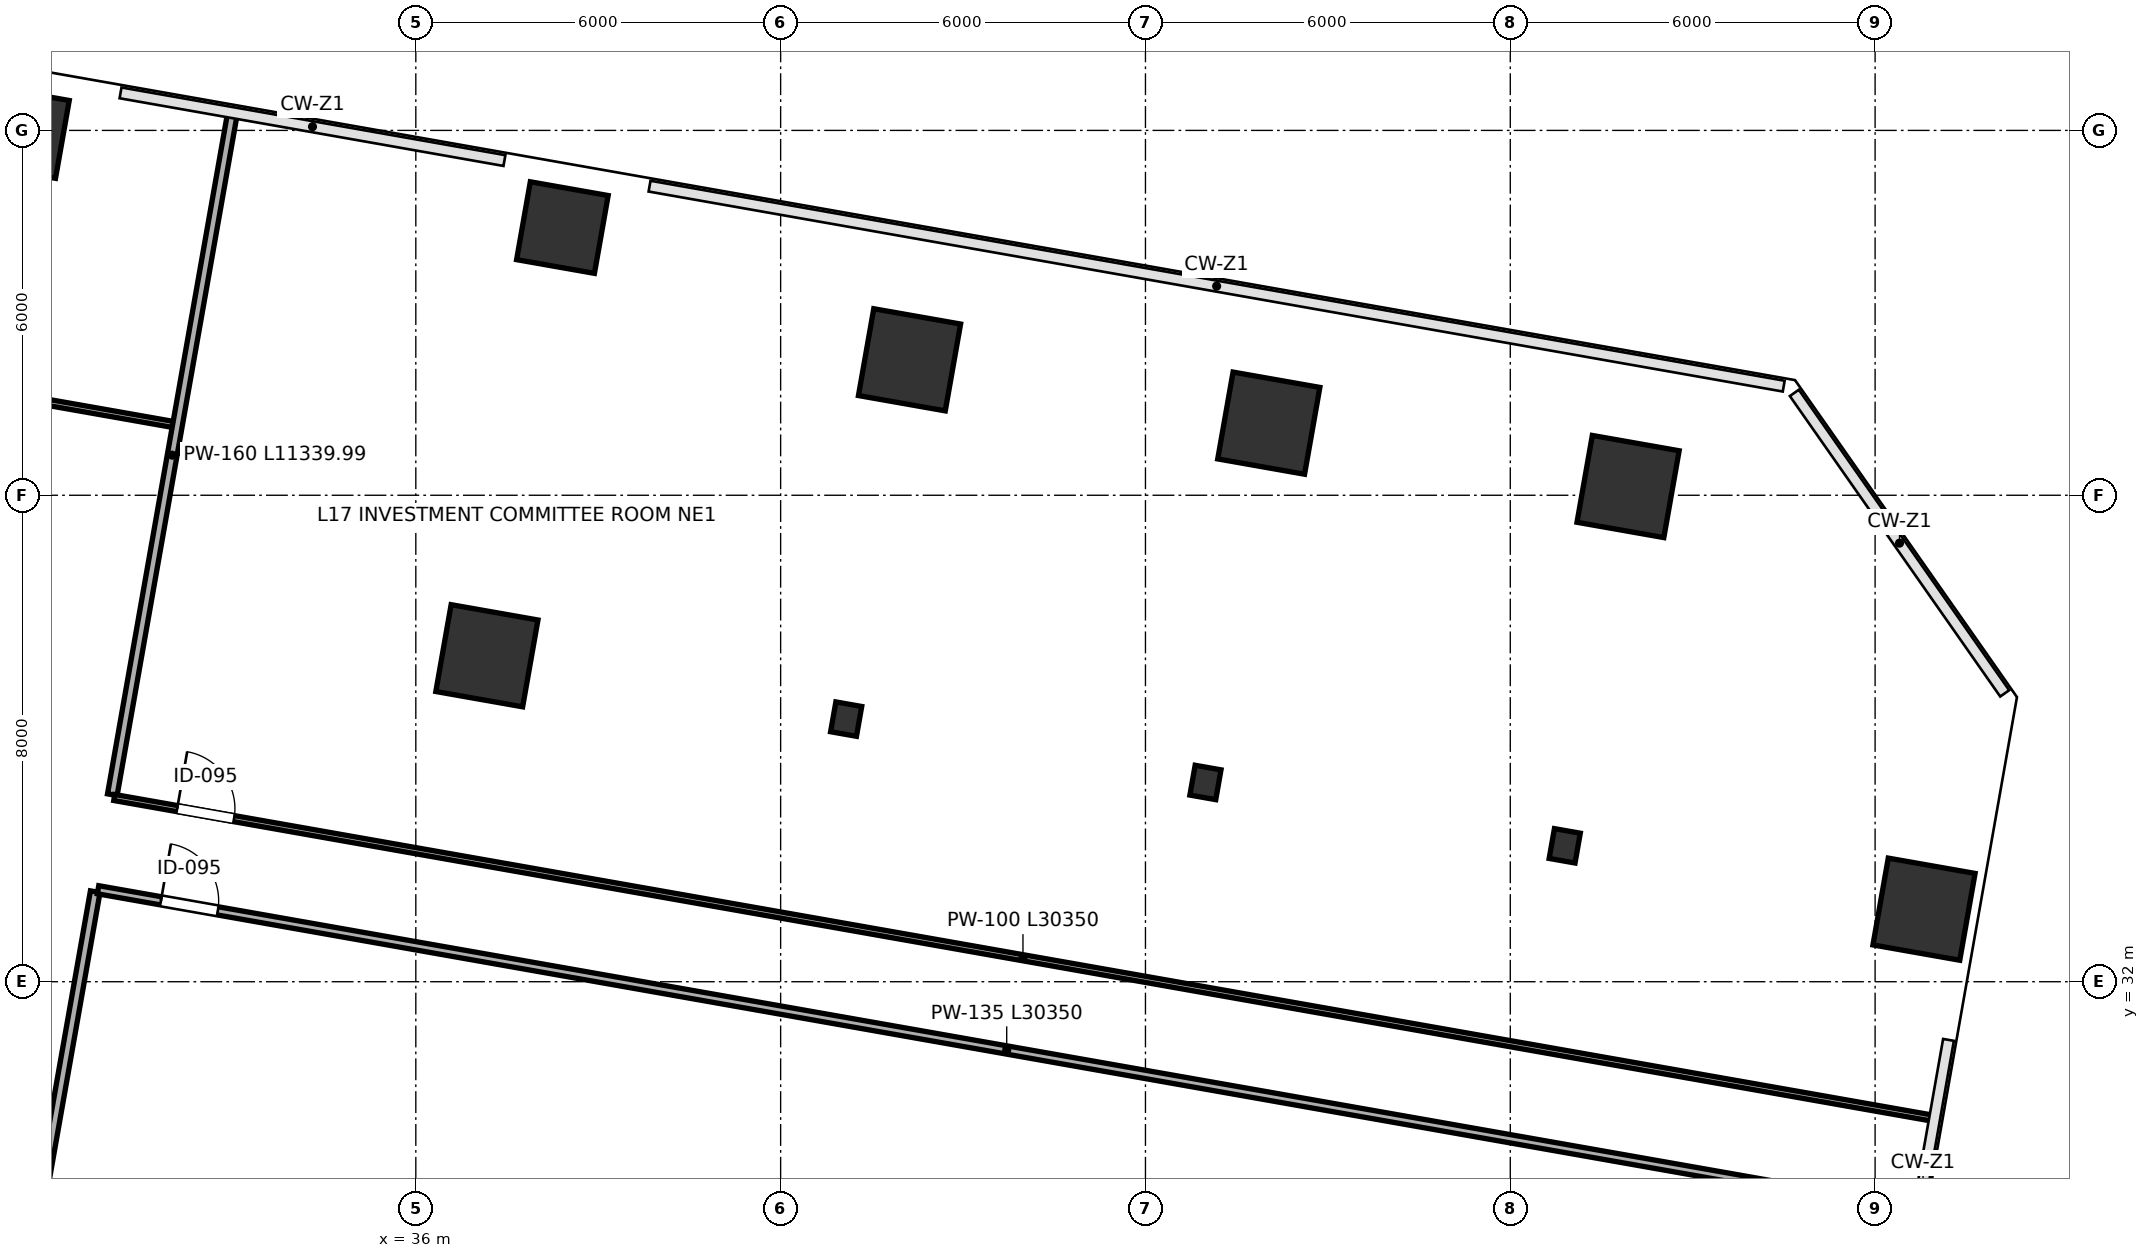
"""IFC4 building model, lengths in metres.
Left out: names, types, materials, properties, quantities, classifications, styles, units other than length and angle.
Written with IfcOpenShell. Run it as: python <this file> out.ifc"""

import sys

from ifc_helpers import new_model, si_unit, direction, frame, frame_2d, origin, origin_2d, place, context, subcontext, project, spatial, rectangle, i_section, extrude, clip, halfspace, source, transform, mapped, element, fill, save


model = new_model("IFC4")
c1 = context("Model", 3, precision=1e-05, world=origin(), true_north=direction((0.0, 1.0)))
c2 = subcontext(c1, "Body", "Model", "MODEL_VIEW")
j1 = project(units=[si_unit("LENGTHUNIT", "METRE"), si_unit("PLANEANGLEUNIT", "RADIAN")], contexts=[c1])
p1 = place(None, origin())
s1 = spatial("IfcSite", under=j1, at=p1, CompositionType="ELEMENT")
p2 = place(p1, origin())
s2 = spatial("IfcBuilding", under=s1, at=p2, CompositionType="ELEMENT")
p3 = place(p2, frame((0.0, 0.0, 79.0)))
s3 = spatial("IfcBuildingStorey", under=s2, at=p3, CompositionType="ELEMENT", Elevation=79.0)
p4 = place(p3, frame((29.547, 45.965, 0.0), z_axis=(0.071829090236, -0.042460260599, 0.996512773659), x_axis=(-0.650101403004, -0.759709304288, 0.014489264645)))
e1 = element("IfcColumn", 1, at=p4, inside=s3, PredefinedType="COLUMN", context=c2, shape_type="Clipping", body=[
    clip(clip(extrude(rectangle(XDim=1.3, YDim=1.3, at=origin_2d()), origin(), (0.0, 0.0, 1.0), 4.215), halfspace(frame((0.0, 0.0, 0.064), z_axis=(0.0, 0.0, -1.0), x_axis=(1.0, 0.0, 0.0)), False)), halfspace(frame((0.0, 0.0, 4.151), z_axis=(0.0, 0.0, 1.0), x_axis=(1.0, 0.0, 0.0)), False)),
])
p5 = place(p3, frame((37.169, 37.361, 0.0), z_axis=(0.0268149495, -0.081371499024, 0.996323058867), x_axis=(-0.989479123471, -0.143908739157, 0.014877466468)))
e2 = element("IfcColumn", 2, at=p5, inside=s3, PredefinedType="COLUMN", context=c2, shape_type="Clipping", body=[
    clip(clip(extrude(rectangle(XDim=1.45, YDim=1.45, at=origin_2d()), origin(), (0.0, 0.0, 1.0), 4.215), halfspace(frame((0.0, 0.0, 0.073), z_axis=(0.0, 0.0, -1.0), x_axis=(1.0, 0.0, 0.0)), False)), halfspace(frame((0.0, 0.0, 4.142), z_axis=(0.0, 0.0, 1.0), x_axis=(1.0, 0.0, 0.0)), False)),
])
p6 = place(p3, frame((38.41, 44.402, 0.0), z_axis=(0.06310397363, -0.088010395457, 0.994118734761), x_axis=(-0.900929917902, -0.433556965496, 0.01880533697)))
e3 = element("IfcColumn", 3, at=p6, inside=s3, PredefinedType="COLUMN", context=c2, shape_type="Clipping", body=[
    clip(clip(extrude(rectangle(XDim=1.3, YDim=1.3, at=origin_2d()), origin(), (0.0, 0.0, 1.0), 4.225), halfspace(frame((0.0, 0.0, 0.083), z_axis=(0.0, 0.0, -1.0), x_axis=(1.0, 0.0, 0.0)), False)), halfspace(frame((0.0, 0.0, 4.142), z_axis=(0.0, 0.0, 1.0), x_axis=(1.0, 0.0, 0.0)), False)),
])
p7 = place(p3, frame((43.078, 36.319, 0.0), z_axis=(0.02107999432, -0.111579586375, 0.993531896692), x_axis=(-0.999717200704, -0.013293072583, 0.019718337617)))
e4 = element("IfcColumn", 4, at=p7, inside=s3, PredefinedType="COLUMN", context=c2, shape_type="Clipping", body=[
    clip(clip(extrude(i_section(OverallWidth=0.432, OverallDepth=0.498, WebThickness=0.056, FlangeThickness=0.089, FilletRadius=0.015, at=origin_2d()), origin(), (0.0, 0.0, 1.0), 4.227), halfspace(frame((0.0, 0.0, 0.033), z_axis=(0.0, 0.0, -1.0), x_axis=(1.0, 0.0, 0.0)), False)), halfspace(frame((0.0, 0.0, 4.194), z_axis=(0.0, 0.0, 1.0), x_axis=(1.0, 0.0, 0.0)), False)),
])
p8 = place(p3, frame((44.12, 42.228, 0.0), z_axis=(0.051425658512, -0.117091381657, 0.991788793034), x_axis=(-0.970931417652, -0.238325447494, 0.022207280165)))
e5 = element("IfcColumn", 5, at=p8, inside=s3, PredefinedType="COLUMN", context=c2, shape_type="Clipping", body=[
    clip(clip(extrude(rectangle(XDim=1.45, YDim=1.45, at=origin_2d()), origin(), (0.0, 0.0, 1.0), 4.235), halfspace(frame((0.0, 0.0, 0.109), z_axis=(0.0, 0.0, -1.0), x_axis=(1.0, 0.0, 0.0)), False)), halfspace(frame((0.0, 0.0, 4.125), z_axis=(0.0, 0.0, 1.0), x_axis=(1.0, 0.0, 0.0)), False)),
])
p9 = place(p3, frame((48.987, 35.277, 0.0), z_axis=(0.015305043321, -0.141485344082, 0.989822031003), x_axis=(-0.997581110031, 0.064971116092, 0.024712000799)))
e6 = element("IfcColumn", 6, at=p9, inside=s3, PredefinedType="COLUMN", context=c2, shape_type="Clipping", body=[
    clip(clip(extrude(i_section(OverallWidth=0.432, OverallDepth=0.498, WebThickness=0.056, FlangeThickness=0.089, FilletRadius=0.015, at=origin_2d()), origin(), (0.0, 0.0, 1.0), 4.243), halfspace(frame((0.0, 0.0, 0.042), z_axis=(0.0, 0.0, -1.0), x_axis=(1.0, 0.0, 0.0)), False)), halfspace(frame((0.0, 0.0, 4.202), z_axis=(0.0, 0.0, 1.0), x_axis=(1.0, 0.0, 0.0)), False)),
])
p10 = place(p3, frame((50.029, 41.186, 0.0), z_axis=(0.04554798519, -0.146925278836, 0.988098347071), x_axis=(-0.991450493729, -0.127720132467, 0.026711163325)))
e7 = element("IfcColumn", 7, at=p10, inside=s3, PredefinedType="COLUMN", context=c2, shape_type="Clipping", body=[
    clip(clip(extrude(rectangle(XDim=1.45, YDim=1.45, at=origin_2d()), origin(), (0.0, 0.0, 1.0), 4.25), halfspace(frame((0.0, 0.0, 0.132), z_axis=(0.0, 0.0, -1.0), x_axis=(1.0, 0.0, 0.0)), False)), halfspace(frame((0.0, 0.0, 4.119), z_axis=(0.0, 0.0, 1.0), x_axis=(1.0, 0.0, 0.0)), False)),
])
p11 = place(p3, frame((54.896, 34.235, 0.0), z_axis=(0.009564159458, -0.171009461927, 0.985222965011), x_axis=(-0.992824461786, 0.115823176478, 0.029741887466)))
e8 = element("IfcColumn", 8, at=p11, inside=s3, PredefinedType="COLUMN", context=c2, shape_type="Clipping", body=[
    clip(clip(extrude(i_section(OverallWidth=0.432, OverallDepth=0.498, WebThickness=0.056, FlangeThickness=0.089, FilletRadius=0.015, at=origin_2d()), origin(), (0.0, 0.0, 1.0), 4.263), halfspace(frame((0.0, 0.0, 0.05), z_axis=(0.0, 0.0, -1.0), x_axis=(1.0, 0.0, 0.0)), False)), halfspace(frame((0.0, 0.0, 4.213), z_axis=(0.0, 0.0, 1.0), x_axis=(1.0, 0.0, 0.0)), False)),
])
p12 = place(p3, frame((55.937, 40.144, 0.0), z_axis=(0.03967709525, -0.17637440756, 0.983523155025), x_axis=(-0.998279792226, -0.049517344567, 0.031392499437)))
e9 = element("IfcColumn", 9, at=p12, inside=s3, PredefinedType="COLUMN", context=c2, shape_type="Clipping", body=[
    clip(clip(extrude(rectangle(XDim=1.45, YDim=1.45, at=origin_2d()), origin(), (0.0, 0.0, 1.0), 4.27), halfspace(frame((0.0, 0.0, 0.155), z_axis=(0.0, 0.0, -1.0), x_axis=(1.0, 0.0, 0.0)), False)), halfspace(frame((0.0, 0.0, 4.115), z_axis=(0.0, 0.0, 1.0), x_axis=(1.0, 0.0, 0.0)), False)),
])
p13 = place(p3, frame((60.804, 33.193, 0.0), z_axis=(0.003929750961, -0.200132534446, 0.979760953352), x_axis=(-0.987958013285, 0.150767210127, 0.03475934891)))
e10 = element("IfcColumn", 10, at=p13, inside=s3, PredefinedType="COLUMN", context=c2, shape_type="Clipping", body=[
    clip(clip(extrude(rectangle(XDim=1.45, YDim=1.45, at=origin_2d()), origin(), (0.0, 0.0, 1.0), 4.287), halfspace(frame((0.0, 0.0, 0.172), z_axis=(0.0, 0.0, -1.0), x_axis=(1.0, 0.0, 0.0)), False)), halfspace(frame((0.0, 0.0, 4.114), z_axis=(0.0, 0.0, 1.0), x_axis=(1.0, 0.0, 0.0)), False)),
])
p14 = place(p3, frame((6.83, 45.604, 0.0), z_axis=(0.0, 0.0, 1.0), x_axis=(0.984806496121, -0.173655305701, 0.0)))
e11 = element("IfcWall", 11, at=p14, inside=s3, PredefinedType="PARTITIONING", context=c2, shape_type="SweptSolid", body=[
    extrude(rectangle(XDim=25.6, YDim=0.1, at=frame_2d((12.8, 0.0))), origin(), (0.0, 0.0, 1.0), 3.96),
])
p15 = place(p14, frame((1.05, 0.0, 0.0)))
e12 = element("IfcOpeningElement", 12, at=p15, cuts=e11, PredefinedType="OPENING", context=c2, shape_type="SweptSolid", body=[
    extrude(rectangle(XDim=0.95, YDim=2.15, at=frame_2d((0.475, 1.075))), frame((0.0, 0.06, 0.0), z_axis=(0.0, -1.0, 0.0), x_axis=(1.0, 0.0, 0.0)), (0.0, 0.0, 1.0), 0.12),
])
p16 = place(p3, frame((31.009, 35.076, 0.0), z_axis=(0.0, 0.0, 1.0), x_axis=(0.173653918008, 0.984806740818, 0.0)))
e13 = element("IfcWall", 13, at=p16, inside=s3, PredefinedType="PARTITIONING", context=c2, shape_type="SweptSolid", body=[
    extrude(rectangle(XDim=11.34, YDim=0.16, at=frame_2d((5.67, 0.0))), origin(), (0.0, 0.0, 1.0), 3.095),
])
p17 = place(p3, frame((27.067, 12.72, 0.0), z_axis=(0.0, 0.0, 1.0), x_axis=(0.173654514703, 0.984806635601, 0.0)))
e14 = element("IfcWall", 14, at=p17, inside=s3, PredefinedType="PARTITIONING", context=c2, shape_type="SweptSolid", body=[
    extrude(rectangle(XDim=21.08, YDim=0.16, at=frame_2d((10.54, 0.0))), origin(), (0.0, 0.0, 1.0), 3.96),
])
p18 = place(p3, frame((31.041, 35.029, 0.0), z_axis=(0.0, 0.0, 1.0), x_axis=(0.984807519997, -0.173649499156, 0.0)))
e15 = element("IfcWall", 15, at=p18, inside=s3, PredefinedType="PARTITIONING", context=c2, shape_type="SweptSolid", body=[
    extrude(rectangle(XDim=30.35, YDim=0.1, at=frame_2d((15.175, 0.0))), origin(), (0.0, 0.0, 1.0), 3.095),
])
p19 = place(p18, frame((1.05, 0.0, 0.0)))
e16 = element("IfcOpeningElement", 16, at=p19, cuts=e15, PredefinedType="OPENING", context=c2, shape_type="SweptSolid", body=[
    extrude(rectangle(XDim=0.95, YDim=2.15, at=frame_2d((0.475, 1.075))), frame((0.0, 0.06, 0.0), z_axis=(0.0, -1.0, 0.0), x_axis=(1.0, 0.0, 0.0)), (0.0, 0.0, 1.0), 0.12),
])
p20 = place(p3, frame((30.774, 33.513, 0.0), z_axis=(0.0, 0.0, 1.0), x_axis=(0.984807519997, -0.173649499156, 0.0)))
e17 = element("IfcWall", 17, at=p20, inside=s3, PredefinedType="PARTITIONING", context=c2, shape_type="SweptSolid", body=[
    extrude(rectangle(XDim=30.35, YDim=0.135, at=frame_2d((15.175, 0.0))), origin(), (0.0, 0.0, 1.0), 3.095),
])
p21 = place(p20, frame((1.05, 0.0, 0.0)))
e18 = element("IfcOpeningElement", 18, at=p21, cuts=e17, PredefinedType="OPENING", context=c2, shape_type="SweptSolid", body=[
    extrude(rectangle(XDim=0.95, YDim=2.15, at=frame_2d((0.475, 1.075))), frame((0.0, 0.078, 0.0), z_axis=(0.0, -1.0, 0.0), x_axis=(1.0, 0.0, 0.0)), (0.0, 0.0, 1.0), 0.155),
])
m1 = source(origin(), c2, "Body", "SweptSolid", [
    extrude(rectangle(XDim=0.95, YDim=2.15, at=frame_2d((0.475, 1.075))), frame((0.0, 0.025, 0.0), z_axis=(0.0, -1.0, 0.0), x_axis=(1.0, 0.0, 0.0)), (0.0, 0.0, 1.0), 0.05),
])
p22 = place(p19, origin())
e19 = element("IfcDoor", 19, at=p22, inside=s3, OperationType="SINGLE_SWING_LEFT", PredefinedType="DOOR", context=c2, shape_type="MappedRepresentation", body=[
    mapped(m1, transform((0.0, 0.0, 0.0), scale=1.0)),
])
fill(e16, e19)
p23 = place(p21, origin())
e20 = element("IfcDoor", 20, at=p23, inside=s3, OperationType="SINGLE_SWING_LEFT", PredefinedType="DOOR", context=c2, shape_type="MappedRepresentation", body=[
    mapped(m1, transform((0.0, 0.0, 0.0), scale=1.0)),
])
fill(e18, e20)
save(model, sys.argv[1])
